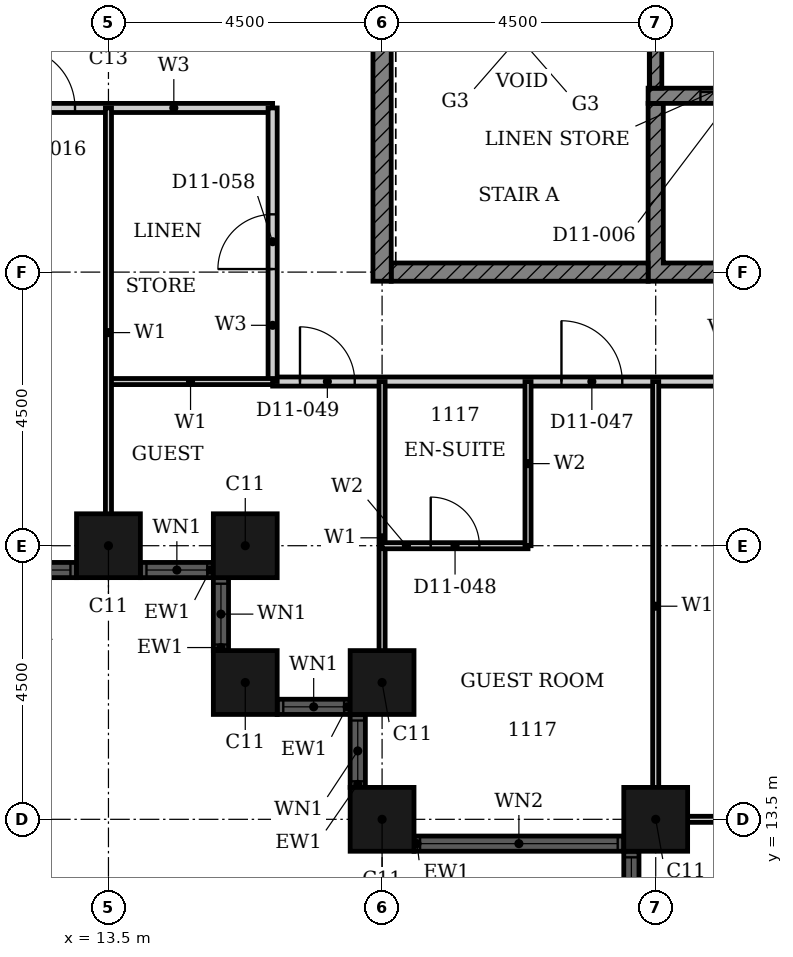
"""IFC4 building model, lengths in metres.
Left out: names, types, materials, properties, quantities, classifications, styles, units other than length and angle.
Written with IfcOpenShell. Run it as: python <this file> out.ifc"""

import sys

from ifc_helpers import new_model, si_unit, direction, frame, frame_2d, origin, origin_2d, place, context, subcontext, project, spatial, polyline, rectangle, hollow_rectangle, outline, extrude, element, fill, save


model = new_model("IFC4")
c1 = context("Model", 3, precision=1e-05, world=origin(), true_north=direction((0.0, 1.0)))
c2 = subcontext(c1, "Body", "Model", "MODEL_VIEW")
j1 = project(units=[si_unit("LENGTHUNIT", "METRE"), si_unit("PLANEANGLEUNIT", "RADIAN")], contexts=[c1])
p1 = place(None, origin())
s1 = spatial("IfcSite", under=j1, at=p1, CompositionType="ELEMENT")
p2 = place(p1, origin())
s2 = spatial("IfcBuilding", under=s1, at=p2, CompositionType="ELEMENT")
p3 = place(p2, frame((0.0, 0.0, 52.8)))
s3 = spatial("IfcBuildingStorey", under=s2, at=p3, CompositionType="ELEMENT", Elevation=52.8)
for number, where, z_axis, x_axis in (
    (1, (13.5, 18.0, 0.0), (0.0, 0.0, 1.0), (1.0, 0.0, 0.0)),
    (2, (15.75, 18.0, 0.0), (0.0, 0.0, 1.0), (1.0, 0.0, 0.0)),
    (3, (15.75, 15.75, 0.0), (0.0, 0.0, 1.0), (1.0, 0.0, 0.0)),
    (4, (18.0, 15.75, 0.0), (0.0, 0.0, 1.0), (1.0, 0.0, 0.0)),
    (5, (18.0, 13.5, 0.0), (0.0, 0.0, 1.0), (1.0, 0.0, 0.0)),
    (6, (22.5, 13.5, 0.0), (0.0, 0.0, 1.0), (1.0, 0.0, 0.0)),
):
    element("IfcColumn", number, at=place(p3, frame(where, z_axis=z_axis, x_axis=x_axis)), inside=s3, PredefinedType="COLUMN", context=c2, shape_type="SweptSolid", body=[
        extrude(hollow_rectangle(XDim=1.05, YDim=1.05, WallThickness=0.034, at=origin_2d()), origin(), (0.0, 0.0, 1.0), 3.6),
    ])
p4 = place(p3, frame((5.025, 17.6, 0.0), z_axis=(0.0, 0.0, 1.0), x_axis=(1.0, 0.0, 0.0)))
e7 = element("IfcWall", 7, at=p4, inside=s3, PredefinedType="SOLIDWALL", context=c2, shape_type="SweptSolid", body=[
    extrude(rectangle(XDim=7.95, YDim=0.25, at=frame_2d((3.975, 0.0))), origin(), (0.0, 0.0, 1.0), 3.6),
])
p5 = place(p4, frame((0.1, 0.0, 0.9)))
e8 = element("IfcOpeningElement", 8, at=p5, cuts=e7, PredefinedType="OPENING", context=c2, shape_type="SweptSolid", body=[
    extrude(rectangle(XDim=3.25, YDim=2.08, at=frame_2d((1.625, 1.04))), frame((0.0, 0.135, 0.0), z_axis=(0.0, -1.0, 0.0), x_axis=(1.0, 0.0, 0.0)), (0.0, 0.0, 1.0), 0.27),
])
p6 = place(p4, frame((4.6, 0.0, 0.9)))
e9 = element("IfcOpeningElement", 9, at=p6, cuts=e7, PredefinedType="OPENING", context=c2, shape_type="SweptSolid", body=[
    extrude(rectangle(XDim=3.25, YDim=2.08, at=frame_2d((1.625, 1.04))), frame((0.0, 0.135, 0.0), z_axis=(0.0, -1.0, 0.0), x_axis=(1.0, 0.0, 0.0)), (0.0, 0.0, 1.0), 0.27),
])
p7 = place(p3, frame((14.025, 17.6, 0.0), z_axis=(0.0, 0.0, 1.0), x_axis=(1.0, 0.0, 0.0)))
e10 = element("IfcWall", 10, at=p7, inside=s3, PredefinedType="SOLIDWALL", context=c2, shape_type="SweptSolid", body=[
    extrude(rectangle(XDim=1.2, YDim=0.25, at=frame_2d((0.6, 0.0))), origin(), (0.0, 0.0, 1.0), 3.6),
])
p8 = place(p7, frame((0.1, 0.0, 0.9)))
e11 = element("IfcOpeningElement", 11, at=p8, cuts=e10, PredefinedType="OPENING", context=c2, shape_type="SweptSolid", body=[
    extrude(rectangle(XDim=1.0, YDim=2.08, at=frame_2d((0.5, 1.04))), frame((0.0, 0.135, 0.0), z_axis=(0.0, -1.0, 0.0), x_axis=(1.0, 0.0, 0.0)), (0.0, 0.0, 1.0), 0.27),
])
p9 = place(p3, frame((15.35, 17.475, 0.0), z_axis=(0.0, 0.0, 1.0), x_axis=(0.0, -1.0, 0.0)))
e12 = element("IfcWall", 12, at=p9, inside=s3, PredefinedType="SOLIDWALL", context=c2, shape_type="SweptSolid", body=[
    extrude(rectangle(XDim=1.2, YDim=0.25, at=frame_2d((0.6, 0.0))), origin(), (0.0, 0.0, 1.0), 3.6),
])
p10 = place(p9, frame((0.1, 0.0, 0.9)))
e13 = element("IfcOpeningElement", 13, at=p10, cuts=e12, PredefinedType="OPENING", context=c2, shape_type="SweptSolid", body=[
    extrude(rectangle(XDim=1.0, YDim=2.08, at=frame_2d((0.5, 1.04))), frame((0.0, 0.135, 0.0), z_axis=(0.0, -1.0, 0.0), x_axis=(1.0, 0.0, 0.0)), (0.0, 0.0, 1.0), 0.27),
])
p11 = place(p3, frame((16.275, 15.35, 0.0), z_axis=(0.0, 0.0, 1.0), x_axis=(1.0, 0.0, 0.0)))
e14 = element("IfcWall", 14, at=p11, inside=s3, PredefinedType="SOLIDWALL", context=c2, shape_type="SweptSolid", body=[
    extrude(rectangle(XDim=1.2, YDim=0.25, at=frame_2d((0.6, 0.0))), origin(), (0.0, 0.0, 1.0), 3.6),
])
p12 = place(p11, frame((0.1, 0.0, 0.9)))
e15 = element("IfcOpeningElement", 15, at=p12, cuts=e14, PredefinedType="OPENING", context=c2, shape_type="SweptSolid", body=[
    extrude(rectangle(XDim=1.0, YDim=2.08, at=frame_2d((0.5, 1.04))), frame((0.0, 0.135, 0.0), z_axis=(0.0, -1.0, 0.0), x_axis=(1.0, 0.0, 0.0)), (0.0, 0.0, 1.0), 0.27),
])
p13 = place(p3, frame((17.6, 15.225, 0.0), z_axis=(0.0, 0.0, 1.0), x_axis=(0.0, -1.0, 0.0)))
e16 = element("IfcWall", 16, at=p13, inside=s3, PredefinedType="SOLIDWALL", context=c2, shape_type="SweptSolid", body=[
    extrude(rectangle(XDim=1.2, YDim=0.25, at=frame_2d((0.6, 0.0))), origin(), (0.0, 0.0, 1.0), 3.6),
])
p14 = place(p13, frame((0.1, 0.0, 0.9)))
e17 = element("IfcOpeningElement", 17, at=p14, cuts=e16, PredefinedType="OPENING", context=c2, shape_type="SweptSolid", body=[
    extrude(rectangle(XDim=1.0, YDim=2.08, at=frame_2d((0.5, 1.04))), frame((0.0, 0.135, 0.0), z_axis=(0.0, -1.0, 0.0), x_axis=(1.0, 0.0, 0.0)), (0.0, 0.0, 1.0), 0.27),
])
p15 = place(p3, frame((18.525, 13.1, 0.0), z_axis=(0.0, 0.0, 1.0), x_axis=(1.0, 0.0, 0.0)))
e18 = element("IfcWall", 18, at=p15, inside=s3, PredefinedType="SOLIDWALL", context=c2, shape_type="SweptSolid", body=[
    extrude(rectangle(XDim=3.45, YDim=0.25, at=frame_2d((1.725, 0.0))), origin(), (0.0, 0.0, 1.0), 3.6),
])
p16 = place(p15, frame((0.1, 0.0, 0.9)))
e19 = element("IfcOpeningElement", 19, at=p16, cuts=e18, PredefinedType="OPENING", context=c2, shape_type="SweptSolid", body=[
    extrude(rectangle(XDim=3.25, YDim=2.08, at=frame_2d((1.625, 1.04))), frame((0.0, 0.135, 0.0), z_axis=(0.0, -1.0, 0.0), x_axis=(1.0, 0.0, 0.0)), (0.0, 0.0, 1.0), 0.27),
])
p17 = place(p3, frame((22.1, 12.975, 0.0), z_axis=(0.0, 0.0, 1.0), x_axis=(0.0, -1.0, 0.0)))
e20 = element("IfcWall", 20, at=p17, inside=s3, PredefinedType="SOLIDWALL", context=c2, shape_type="SweptSolid", body=[
    extrude(rectangle(XDim=7.95, YDim=0.25, at=frame_2d((3.975, 0.0))), origin(), (0.0, 0.0, 1.0), 3.6),
])
p18 = place(p17, frame((0.1, 0.0, 0.9)))
e21 = element("IfcOpeningElement", 21, at=p18, cuts=e20, PredefinedType="OPENING", context=c2, shape_type="SweptSolid", body=[
    extrude(rectangle(XDim=3.25, YDim=2.08, at=frame_2d((1.625, 1.04))), frame((0.0, 0.135, 0.0), z_axis=(0.0, -1.0, 0.0), x_axis=(1.0, 0.0, 0.0)), (0.0, 0.0, 1.0), 0.27),
])
p19 = place(p17, frame((4.6, 0.0, 0.9)))
e22 = element("IfcOpeningElement", 22, at=p19, cuts=e20, PredefinedType="OPENING", context=c2, shape_type="SweptSolid", body=[
    extrude(rectangle(XDim=3.25, YDim=2.08, at=frame_2d((1.625, 1.04))), frame((0.0, 0.135, 0.0), z_axis=(0.0, -1.0, 0.0), x_axis=(1.0, 0.0, 0.0)), (0.0, 0.0, 1.0), 0.27),
])
p20 = place(p3, origin())
e23 = element("IfcWall", 23, at=p20, inside=s3, PredefinedType="SHEAR", context=c2, shape_type="SweptSolid", body=[
    extrude(outline(polyline([(22.375, 22.35), (38.053, 22.35), (38.053, 25.275), (37.803, 25.275), (37.803, 22.65), (35.482, 22.65), (35.482, 25.275), (35.232, 25.275), (35.232, 22.65), (32.911, 22.65), (32.911, 25.275), (32.661, 25.275), (32.661, 22.65), (30.339, 22.65), (30.339, 25.275), (30.089, 25.275), (30.089, 22.65), (27.768, 22.65), (27.768, 25.275), (27.518, 25.275), (27.518, 22.65), (25.197, 22.65), (25.197, 25.275), (24.947, 25.275), (24.947, 22.65), (22.625, 22.65), (22.625, 25.275), (22.375, 25.275), (22.375, 22.35)])), origin(), (0.0, 0.0, 1.0), 3.3),
])
p21 = place(p3, frame((18.15, 22.5, 0.0), z_axis=(0.0, 0.0, 1.0), x_axis=(1.0, 0.0, 0.0)))
e24 = element("IfcWall", 24, at=p21, inside=s3, PredefinedType="SHEAR", context=c2, shape_type="SweptSolid", body=[
    extrude(rectangle(XDim=4.225, YDim=0.3, at=frame_2d((2.113, 0.0))), origin(), (0.0, 0.0, 1.0), 3.3),
])
p22 = place(p3, frame((18.0, 22.35, 0.0), z_axis=(0.0, 0.0, 1.0), x_axis=(0.0, 1.0, 0.0)))
e25 = element("IfcWall", 25, at=p22, inside=s3, PredefinedType="SHEAR", context=c2, shape_type="SweptSolid", body=[
    extrude(rectangle(XDim=9.3, YDim=0.3, at=frame_2d((4.65, 0.0))), origin(), (0.0, 0.0, 1.0), 3.3),
])
p23 = place(p3, frame((22.375, 25.4, 0.0), z_axis=(0.0, 0.0, 1.0), x_axis=(1.0, 0.0, 0.0)))
e26 = element("IfcWall", 26, at=p23, inside=s3, PredefinedType="SHEAR", context=c2, shape_type="SweptSolid", body=[
    extrude(rectangle(XDim=15.678, YDim=0.25, at=frame_2d((7.839, 0.0))), origin(), (0.0, 0.0, 1.0), 3.3),
])
p24 = place(p23, frame((3.432, 0.0, 0.0)))
e27 = element("IfcOpeningElement", 27, at=p24, cuts=e26, PredefinedType="OPENING", context=c2, shape_type="SweptSolid", body=[
    extrude(rectangle(XDim=1.1, YDim=2.1, at=frame_2d((0.55, 1.05))), frame((0.0, 0.135, 0.0), z_axis=(0.0, -1.0, 0.0), x_axis=(1.0, 0.0, 0.0)), (0.0, 0.0, 1.0), 0.27),
])
p25 = place(p23, frame((11.146, 0.0, 0.0)))
e28 = element("IfcOpeningElement", 28, at=p25, cuts=e26, PredefinedType="OPENING", context=c2, shape_type="SweptSolid", body=[
    extrude(rectangle(XDim=1.1, YDim=2.1, at=frame_2d((0.55, 1.05))), frame((0.0, 0.135, 0.0), z_axis=(0.0, -1.0, 0.0), x_axis=(1.0, 0.0, 0.0)), (0.0, 0.0, 1.0), 0.27),
])
p26 = place(p23, frame((13.718, 0.0, 0.0)))
e29 = element("IfcOpeningElement", 29, at=p26, cuts=e26, PredefinedType="OPENING", context=c2, shape_type="SweptSolid", body=[
    extrude(rectangle(XDim=1.1, YDim=2.1, at=frame_2d((0.55, 1.05))), frame((0.0, 0.135, 0.0), z_axis=(0.0, -1.0, 0.0), x_axis=(1.0, 0.0, 0.0)), (0.0, 0.0, 1.0), 0.27),
])
p27 = place(p23, frame((0.861, 0.0, 0.0)))
e30 = element("IfcOpeningElement", 30, at=p27, cuts=e26, PredefinedType="OPENING", context=c2, shape_type="SweptSolid", body=[
    extrude(rectangle(XDim=1.1, YDim=2.1, at=frame_2d((0.55, 1.05))), frame((0.0, 0.135, 0.0), z_axis=(0.0, -1.0, 0.0), x_axis=(1.0, 0.0, 0.0)), (0.0, 0.0, 1.0), 0.27),
])
p28 = place(p3, frame((22.5, 31.35, 0.0), z_axis=(0.0, 0.0, 1.0), x_axis=(0.0, -1.0, 0.0)))
e31 = element("IfcWall", 31, at=p28, inside=s3, PredefinedType="SHEAR", context=c2, shape_type="SweptSolid", body=[
    extrude(rectangle(XDim=5.825, YDim=0.2, at=frame_2d((2.913, 0.0))), origin(), (0.0, 0.0, 1.0), 3.3),
])
p29 = place(p28, frame((0.25, 0.0, 0.0)))
e32 = element("IfcOpeningElement", 32, at=p29, cuts=e31, PredefinedType="OPENING", context=c2, shape_type="SweptSolid", body=[
    extrude(rectangle(XDim=1.8, YDim=2.1, at=frame_2d((0.9, 1.05))), frame((0.0, 0.11, 0.0), z_axis=(0.0, -1.0, 0.0), x_axis=(1.0, 0.0, 0.0)), (0.0, 0.0, 1.0), 0.22),
])
p30 = place(p3, frame((16.2, 20.7, 0.0), z_axis=(0.0, 0.0, 1.0), x_axis=(1.0, 0.0, 0.0)))
e33 = element("IfcWall", 33, at=p30, inside=s3, PredefinedType="PARTITIONING", context=c2, shape_type="SweptSolid", body=[
    extrude(rectangle(XDim=13.5, YDim=0.15, at=frame_2d((6.75, 0.0))), origin(), (0.0, 0.0, 1.0), 3.3),
])
p31 = place(p30, frame((4.75, 0.0, 0.0)))
e34 = element("IfcOpeningElement", 34, at=p31, cuts=e33, PredefinedType="OPENING", context=c2, shape_type="SweptSolid", body=[
    extrude(rectangle(XDim=1.0, YDim=2.1, at=frame_2d((0.5, 1.05))), frame((0.0, 0.085, 0.0), z_axis=(0.0, -1.0, 0.0), x_axis=(1.0, 0.0, 0.0)), (0.0, 0.0, 1.0), 0.17),
])
p32 = place(p30, frame((0.45, 0.0, 0.0)))
e35 = element("IfcOpeningElement", 35, at=p32, cuts=e33, PredefinedType="OPENING", context=c2, shape_type="SweptSolid", body=[
    extrude(rectangle(XDim=0.9, YDim=2.1, at=frame_2d((0.45, 1.05))), frame((0.0, 0.085, 0.0), z_axis=(0.0, -1.0, 0.0), x_axis=(1.0, 0.0, 0.0)), (0.0, 0.0, 1.0), 0.17),
])
p33 = place(p30, frame((9.45, 0.0, 0.0)))
e36 = element("IfcOpeningElement", 36, at=p33, cuts=e33, PredefinedType="OPENING", context=c2, shape_type="SweptSolid", body=[
    extrude(rectangle(XDim=0.9, YDim=2.1, at=frame_2d((0.45, 1.05))), frame((0.0, 0.085, 0.0), z_axis=(0.0, -1.0, 0.0), x_axis=(1.0, 0.0, 0.0)), (0.0, 0.0, 1.0), 0.17),
])
p34 = place(p3, frame((9.0, 25.2, 0.0), z_axis=(0.0, 0.0, 1.0), x_axis=(1.0, 0.0, 0.0)))
e37 = element("IfcWall", 37, at=p34, inside=s3, PredefinedType="PARTITIONING", context=c2, shape_type="SweptSolid", body=[
    extrude(rectangle(XDim=7.2, YDim=0.15, at=frame_2d((3.6, 0.0))), origin(), (0.0, 0.0, 1.0), 3.3),
])
p35 = place(p34, frame((2.95, 0.0, 0.0)))
e38 = element("IfcOpeningElement", 38, at=p35, cuts=e37, PredefinedType="OPENING", context=c2, shape_type="SweptSolid", body=[
    extrude(rectangle(XDim=1.0, YDim=2.1, at=frame_2d((0.5, 1.05))), frame((0.0, 0.085, 0.0), z_axis=(0.0, -1.0, 0.0), x_axis=(1.0, 0.0, 0.0)), (0.0, 0.0, 1.0), 0.17),
])
p36 = place(p3, frame((16.2, 20.7, 0.0), z_axis=(0.0, 0.0, 1.0), x_axis=(0.0, 1.0, 0.0)))
e39 = element("IfcWall", 39, at=p36, inside=s3, PredefinedType="PARTITIONING", context=c2, shape_type="SweptSolid", body=[
    extrude(rectangle(XDim=4.5, YDim=0.15, at=frame_2d((2.25, 0.0))), origin(), (0.0, 0.0, 1.0), 3.3),
])
p37 = place(p36, frame((1.85, 0.0, 0.0)))
e40 = element("IfcOpeningElement", 40, at=p37, cuts=e39, PredefinedType="OPENING", context=c2, shape_type="SweptSolid", body=[
    extrude(rectangle(XDim=0.9, YDim=2.1, at=frame_2d((0.45, 1.05))), frame((0.0, 0.085, 0.0), z_axis=(0.0, -1.0, 0.0), x_axis=(1.0, 0.0, 0.0)), (0.0, 0.0, 1.0), 0.17),
])
p38 = place(p3, frame((22.31, 13.5, 0.0), z_axis=(0.0, 0.0, 1.0), x_axis=(1.0, 0.0, 0.0)))
e41 = element("IfcWall", 41, at=p38, inside=s3, PredefinedType="PARTITIONING", context=c2, shape_type="SweptSolid", body=[
    extrude(rectangle(XDim=7.39, YDim=0.1, at=frame_2d((3.695, 0.0))), origin(), (0.0, 0.0, 1.0), 2.38),
])
p39 = place(p3, frame((13.5, 20.7, 0.0), z_axis=(0.0, 0.0, 1.0), x_axis=(1.0, 0.0, 0.0)))
e42 = element("IfcWall", 42, at=p39, inside=s3, PredefinedType="PARTITIONING", context=c2, shape_type="SweptSolid", body=[
    extrude(rectangle(XDim=2.7, YDim=0.1, at=frame_2d((1.35, 0.0))), origin(), (0.0, 0.0, 1.0), 3.3),
])
p40 = place(p3, frame((13.5, 17.81, 0.0), z_axis=(0.0, 0.0, 1.0), x_axis=(0.0, 1.0, 0.0)))
e43 = element("IfcWall", 43, at=p40, inside=s3, PredefinedType="PARTITIONING", context=c2, shape_type="SweptSolid", body=[
    extrude(rectangle(XDim=7.39, YDim=0.1, at=frame_2d((3.695, 0.0))), origin(), (0.0, 0.0, 1.0), 2.38),
])
p41 = place(p3, frame((18.0, 15.56, 0.0), z_axis=(0.0, 0.0, 1.0), x_axis=(0.0, 1.0, 0.0)))
e44 = element("IfcWall", 44, at=p41, inside=s3, PredefinedType="PARTITIONING", context=c2, shape_type="SweptSolid", body=[
    extrude(rectangle(XDim=5.14, YDim=0.1, at=frame_2d((2.57, 0.0))), origin(), (0.0, 0.0, 1.0), 3.3),
])
p42 = place(p3, frame((22.5, 13.31, 0.0), z_axis=(0.0, 0.0, 1.0), x_axis=(0.0, 1.0, 0.0)))
e45 = element("IfcWall", 45, at=p42, inside=s3, PredefinedType="PARTITIONING", context=c2, shape_type="SweptSolid", body=[
    extrude(rectangle(XDim=7.39, YDim=0.1, at=frame_2d((3.695, 0.0))), origin(), (0.0, 0.0, 1.0), 3.3),
])
p43 = place(p3, frame((18.0, 18.0, 0.0), z_axis=(0.0, 0.0, 1.0), x_axis=(1.0, 0.0, 0.0)))
e46 = element("IfcWall", 46, at=p43, inside=s3, PredefinedType="PARTITIONING", context=c2, shape_type="SweptSolid", body=[
    extrude(rectangle(XDim=2.4, YDim=0.1, at=frame_2d((1.2, 0.0))), origin(), (0.0, 0.0, 1.0), 3.3),
])
p44 = place(p43, frame((0.8, 0.0, 0.0)))
e47 = element("IfcOpeningElement", 47, at=p44, cuts=e46, PredefinedType="OPENING", context=c2, shape_type="SweptSolid", body=[
    extrude(rectangle(XDim=0.8, YDim=2.1, at=frame_2d((0.4, 1.05))), frame((0.0, 0.06, 0.0), z_axis=(0.0, -1.0, 0.0), x_axis=(1.0, 0.0, 0.0)), (0.0, 0.0, 1.0), 0.12),
])
p45 = place(p3, frame((20.4, 18.0, 0.0), z_axis=(0.0, 0.0, 1.0), x_axis=(0.0, 1.0, 0.0)))
e48 = element("IfcWall", 48, at=p45, inside=s3, PredefinedType="PARTITIONING", context=c2, shape_type="SweptSolid", body=[
    extrude(rectangle(XDim=2.7, YDim=0.1, at=frame_2d((1.35, 0.0))), origin(), (0.0, 0.0, 1.0), 3.3),
])
p46 = place(p6, origin())
e49 = element("IfcWindow", 49, at=p46, inside=s3, PartitioningType="SINGLE_PANEL", PredefinedType="WINDOW", context=c2, shape_type="SweptSolid", body=[
    extrude(rectangle(XDim=3.25, YDim=2.08, at=frame_2d((1.625, 1.04))), frame((0.0, 0.03, 0.0), z_axis=(0.0, -1.0, 0.0), x_axis=(1.0, 0.0, 0.0)), (0.0, 0.0, 1.0), 0.06),
])
fill(e9, e49)
p47 = place(p8, origin())
e50 = element("IfcWindow", 50, at=p47, inside=s3, PartitioningType="SINGLE_PANEL", PredefinedType="WINDOW", context=c2, shape_type="SweptSolid", body=[
    extrude(rectangle(XDim=1.0, YDim=2.08, at=frame_2d((0.5, 1.04))), frame((0.0, 0.03, 0.0), z_axis=(0.0, -1.0, 0.0), x_axis=(1.0, 0.0, 0.0)), (0.0, 0.0, 1.0), 0.06),
])
fill(e11, e50)
p48 = place(p10, origin())
e51 = element("IfcWindow", 51, at=p48, inside=s3, PartitioningType="SINGLE_PANEL", PredefinedType="WINDOW", context=c2, shape_type="SweptSolid", body=[
    extrude(rectangle(XDim=1.0, YDim=2.08, at=frame_2d((0.5, 1.04))), frame((0.0, 0.03, 0.0), z_axis=(0.0, -1.0, 0.0), x_axis=(1.0, 0.0, 0.0)), (0.0, 0.0, 1.0), 0.06),
])
fill(e13, e51)
p49 = place(p12, origin())
e52 = element("IfcWindow", 52, at=p49, inside=s3, PartitioningType="SINGLE_PANEL", PredefinedType="WINDOW", context=c2, shape_type="SweptSolid", body=[
    extrude(rectangle(XDim=1.0, YDim=2.08, at=frame_2d((0.5, 1.04))), frame((0.0, 0.03, 0.0), z_axis=(0.0, -1.0, 0.0), x_axis=(1.0, 0.0, 0.0)), (0.0, 0.0, 1.0), 0.06),
])
fill(e15, e52)
p50 = place(p14, origin())
e53 = element("IfcWindow", 53, at=p50, inside=s3, PartitioningType="SINGLE_PANEL", PredefinedType="WINDOW", context=c2, shape_type="SweptSolid", body=[
    extrude(rectangle(XDim=1.0, YDim=2.08, at=frame_2d((0.5, 1.04))), frame((0.0, 0.03, 0.0), z_axis=(0.0, -1.0, 0.0), x_axis=(1.0, 0.0, 0.0)), (0.0, 0.0, 1.0), 0.06),
])
fill(e17, e53)
p51 = place(p16, origin())
e54 = element("IfcWindow", 54, at=p51, inside=s3, PartitioningType="SINGLE_PANEL", PredefinedType="WINDOW", context=c2, shape_type="SweptSolid", body=[
    extrude(rectangle(XDim=3.25, YDim=2.08, at=frame_2d((1.625, 1.04))), frame((0.0, 0.03, 0.0), z_axis=(0.0, -1.0, 0.0), x_axis=(1.0, 0.0, 0.0)), (0.0, 0.0, 1.0), 0.06),
])
fill(e19, e54)
p52 = place(p18, origin())
e55 = element("IfcWindow", 55, at=p52, inside=s3, PartitioningType="SINGLE_PANEL", PredefinedType="WINDOW", context=c2, shape_type="SweptSolid", body=[
    extrude(rectangle(XDim=3.25, YDim=2.08, at=frame_2d((1.625, 1.04))), frame((0.0, 0.03, 0.0), z_axis=(0.0, -1.0, 0.0), x_axis=(1.0, 0.0, 0.0)), (0.0, 0.0, 1.0), 0.06),
])
fill(e21, e55)
p53 = place(p27, origin())
e56 = element("IfcDoor", 56, at=p53, inside=s3, OperationType="DOUBLE_DOOR_SLIDING", PredefinedType="DOOR", context=c2, shape_type="SweptSolid", body=[
    extrude(rectangle(XDim=1.1, YDim=2.1, at=frame_2d((0.55, 1.05))), frame((0.0, 0.025, 0.0), z_axis=(0.0, -1.0, 0.0), x_axis=(1.0, 0.0, 0.0)), (0.0, 0.0, 1.0), 0.05),
])
fill(e30, e56)
p54 = place(p35, origin())
e57 = element("IfcDoor", 57, at=p54, inside=s3, OperationType="SINGLE_SWING_RIGHT", PredefinedType="DOOR", context=c2, shape_type="SweptSolid", body=[
    extrude(rectangle(XDim=1.0, YDim=2.1, at=frame_2d((0.5, 1.05))), frame((0.0, 0.025, 0.0), z_axis=(0.0, -1.0, 0.0), x_axis=(1.0, 0.0, 0.0)), (0.0, 0.0, 1.0), 0.05),
])
fill(e38, e57)
p55 = place(p31, origin())
e58 = element("IfcDoor", 58, at=p55, inside=s3, OperationType="SINGLE_SWING_RIGHT", PredefinedType="DOOR", context=c2, shape_type="SweptSolid", body=[
    extrude(rectangle(XDim=1.0, YDim=2.1, at=frame_2d((0.5, 1.05))), frame((0.0, 0.025, 0.0), z_axis=(0.0, -1.0, 0.0), x_axis=(1.0, 0.0, 0.0)), (0.0, 0.0, 1.0), 0.05),
])
fill(e34, e58)
p56 = place(p44, origin())
e59 = element("IfcDoor", 59, at=p56, inside=s3, OperationType="SINGLE_SWING_LEFT", PredefinedType="DOOR", context=c2, shape_type="SweptSolid", body=[
    extrude(rectangle(XDim=0.8, YDim=2.1, at=frame_2d((0.4, 1.05))), frame((0.0, 0.025, 0.0), z_axis=(0.0, -1.0, 0.0), x_axis=(1.0, 0.0, 0.0)), (0.0, 0.0, 1.0), 0.05),
])
fill(e47, e59)
p57 = place(p32, origin())
e60 = element("IfcDoor", 60, at=p57, inside=s3, OperationType="SINGLE_SWING_LEFT", PredefinedType="DOOR", context=c2, shape_type="SweptSolid", body=[
    extrude(rectangle(XDim=0.9, YDim=2.1, at=frame_2d((0.45, 1.05))), frame((0.0, 0.025, 0.0), z_axis=(0.0, -1.0, 0.0), x_axis=(1.0, 0.0, 0.0)), (0.0, 0.0, 1.0), 0.05),
])
fill(e35, e60)
p58 = place(p37, origin())
e61 = element("IfcDoor", 61, at=p58, inside=s3, OperationType="SINGLE_SWING_RIGHT", PredefinedType="DOOR", context=c2, shape_type="SweptSolid", body=[
    extrude(rectangle(XDim=0.9, YDim=2.1, at=frame_2d((0.45, 1.05))), frame((0.0, 0.025, 0.0), z_axis=(0.0, -1.0, 0.0), x_axis=(1.0, 0.0, 0.0)), (0.0, 0.0, 1.0), 0.05),
])
fill(e40, e61)
save(model, sys.argv[1])
